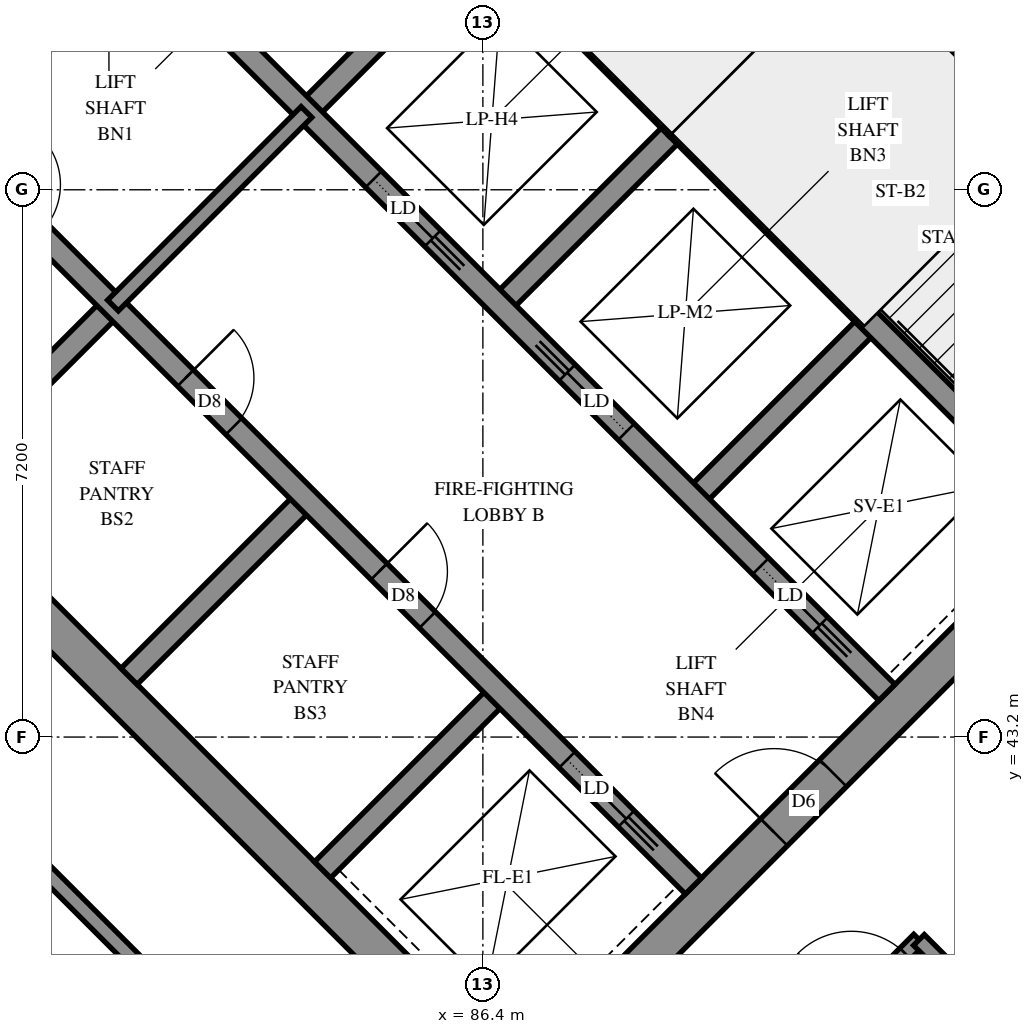
"""IFC4 building model, lengths in metres.
Left out: names, types, materials, properties, quantities, classifications, styles, units other than length and angle.
Written with IfcOpenShell. Run it as: python <this file> out.ifc"""

import sys

from ifc_helpers import new_model, si_unit, direction, frame, frame_2d, origin, place, context, subcontext, project, spatial, rectangle, extrude, element, fill, save


model = new_model("IFC4")
c1 = context("Model", 3, precision=1e-05, world=origin(), true_north=direction((0.0, 1.0)))
c2 = subcontext(c1, "Body", "Model", "MODEL_VIEW")
j1 = project(units=[si_unit("LENGTHUNIT", "METRE"), si_unit("PLANEANGLEUNIT", "RADIAN")], contexts=[c1])
p1 = place(None, origin())
s1 = spatial("IfcSite", under=j1, at=p1, CompositionType="ELEMENT")
p2 = place(p1, origin())
s2 = spatial("IfcBuilding", under=s1, at=p2, CompositionType="ELEMENT")
p3 = place(p2, frame((0.0, 0.0, 203.2)))
s3 = spatial("IfcBuildingStorey", under=s2, at=p3, CompositionType="ELEMENT", Elevation=203.2)
p4 = place(p3, frame((76.124, 49.267, -0.3), z_axis=(0.0, 0.0, 1.0), x_axis=(0.7071067812, -0.7071067812, 0.0)))
e1 = element("IfcWall", 1, at=p4, inside=s3, PredefinedType="SHEAR", context=c2, shape_type="SweptSolid", body=[
    extrude(rectangle(XDim=15.4, YDim=0.5, at=frame_2d((7.7, 0.0))), origin(), (0.0, 0.0, 1.0), 2.7),
])
p5 = place(p3, frame((86.66, 59.802, -0.3), z_axis=(0.0, 0.0, 1.0), x_axis=(0.7071067812, -0.7071067812, 0.0)))
e2 = element("IfcWall", 2, at=p5, inside=s3, PredefinedType="SHEAR", context=c2, shape_type="SweptSolid", body=[
    extrude(rectangle(XDim=15.4, YDim=0.5, at=frame_2d((7.7, 0.0))), origin(), (0.0, 0.0, 1.0), 2.7),
])
p6 = place(p5, frame((10.5, 0.0, 0.3)))
e3 = element("IfcOpeningElement", 3, at=p6, cuts=e2, PredefinedType="OPENING", context=c2, shape_type="SweptSolid", body=[
    extrude(rectangle(XDim=0.8, YDim=2.1, at=frame_2d((0.4, 1.05))), frame((0.0, 0.26, 0.0), z_axis=(0.0, -1.0, 0.0), x_axis=(1.0, 0.0, 0.0)), (0.0, 0.0, 1.0), 0.52),
])
p7 = place(p3, frame((76.478, 49.267, -0.3), z_axis=(0.0, 0.0, 1.0), x_axis=(0.7071067812, 0.7071067812, 0.0)))
e4 = element("IfcWall", 4, at=p7, inside=s3, PredefinedType="SHEAR", context=c2, shape_type="SweptSolid", body=[
    extrude(rectangle(XDim=14.4, YDim=0.5, at=frame_2d((7.2, 0.0))), origin(), (0.0, 0.0, 1.0), 2.7),
])
p8 = place(p7, frame((4.55, 0.0, 0.3)))
e5 = element("IfcOpeningElement", 5, at=p8, cuts=e4, PredefinedType="OPENING", context=c2, shape_type="SweptSolid", body=[
    extrude(rectangle(XDim=1.1, YDim=2.1, at=frame_2d((0.55, 1.05))), frame((0.0, 0.26, 0.0), z_axis=(0.0, -1.0, 0.0), x_axis=(1.0, 0.0, 0.0)), (0.0, 0.0, 1.0), 0.52),
])
p9 = place(p7, frame((11.35, 0.0, 0.3)))
e6 = element("IfcOpeningElement", 6, at=p9, cuts=e4, PredefinedType="OPENING", context=c2, shape_type="SweptSolid", body=[
    extrude(rectangle(XDim=1.1, YDim=2.1, at=frame_2d((0.55, 1.05))), frame((0.0, 0.26, 0.0), z_axis=(0.0, -1.0, 0.0), x_axis=(1.0, 0.0, 0.0)), (0.0, 0.0, 1.0), 0.52),
])
p10 = place(p3, frame((87.013, 38.731, -0.3), z_axis=(0.0, 0.0, 1.0), x_axis=(0.7071067812, 0.7071067812, 0.0)))
e7 = element("IfcWall", 7, at=p10, inside=s3, PredefinedType="SHEAR", context=c2, shape_type="SweptSolid", body=[
    extrude(rectangle(XDim=14.4, YDim=0.5, at=frame_2d((7.2, 0.0))), origin(), (0.0, 0.0, 1.0), 2.7),
])
p11 = place(p10, frame((4.55, 0.0, 0.3)))
e8 = element("IfcOpeningElement", 8, at=p11, cuts=e7, PredefinedType="OPENING", context=c2, shape_type="SweptSolid", body=[
    extrude(rectangle(XDim=1.1, YDim=2.1, at=frame_2d((0.55, 1.05))), frame((0.0, 0.26, 0.0), z_axis=(0.0, -1.0, 0.0), x_axis=(1.0, 0.0, 0.0)), (0.0, 0.0, 1.0), 0.52),
])
p12 = place(p10, frame((11.35, 0.0, 0.3)))
e9 = element("IfcOpeningElement", 9, at=p12, cuts=e7, PredefinedType="OPENING", context=c2, shape_type="SweptSolid", body=[
    extrude(rectangle(XDim=1.1, YDim=2.1, at=frame_2d((0.55, 1.05))), frame((0.0, 0.26, 0.0), z_axis=(0.0, -1.0, 0.0), x_axis=(1.0, 0.0, 0.0)), (0.0, 0.0, 1.0), 0.52),
])
for number, where, z_axis, x_axis in (
    (10, (79.2, 46.544, 0.0), (0.0, 0.0, 1.0), (0.707, 0.707, 0.0)),
    (11, (84.079, 51.423, 0.0), (0.0, 0.0, 1.0), (0.707, 0.707, 0.0)),
):
    element("IfcWall", number, at=place(p3, frame(where, z_axis=z_axis, x_axis=x_axis)), inside=s3, PredefinedType="SOLIDWALL", context=c2, shape_type="SweptSolid", body=[
        extrude(rectangle(XDim=3.3, YDim=0.3, at=frame_2d((1.65, 0.0))), origin(), (0.0, 0.0, 1.0), 3.1),
    ])
p13 = place(p3, frame((81.746, 43.999, 0.0), z_axis=(0.0, 0.0, 1.0), x_axis=(0.7071067812, 0.7071067812, 0.0)))
e12 = element("IfcWall", 12, at=p13, inside=s3, PredefinedType="SOLIDWALL", context=c2, shape_type="SweptSolid", body=[
    extrude(rectangle(XDim=3.3, YDim=0.3, at=frame_2d((1.65, 0.0))), origin(), (0.0, 0.0, 1.0), 3.1),
])
p14 = place(p3, frame((86.625, 48.878, 0.0), z_axis=(0.0, 0.0, 1.0), x_axis=(0.7071067812, 0.7071067812, 0.0)))
e13 = element("IfcWall", 13, at=p14, inside=s3, PredefinedType="SOLIDWALL", context=c2, shape_type="SweptSolid", body=[
    extrude(rectangle(XDim=3.3, YDim=0.3, at=frame_2d((1.65, 0.0))), origin(), (0.0, 0.0, 1.0), 3.1),
])
p15 = place(p3, frame((84.291, 41.453, 0.0), z_axis=(0.0, 0.0, 1.0), x_axis=(0.7071067812, 0.7071067812, 0.0)))
e14 = element("IfcWall", 14, at=p15, inside=s3, PredefinedType="SOLIDWALL", context=c2, shape_type="SweptSolid", body=[
    extrude(rectangle(XDim=3.3, YDim=0.3, at=frame_2d((1.65, 0.0))), origin(), (0.0, 0.0, 1.0), 3.1),
])
p16 = place(p3, frame((89.17, 46.332, 0.0), z_axis=(0.0, 0.0, 1.0), x_axis=(0.7071067812, 0.7071067812, 0.0)))
e15 = element("IfcWall", 15, at=p16, inside=s3, PredefinedType="SOLIDWALL", context=c2, shape_type="SweptSolid", body=[
    extrude(rectangle(XDim=3.3, YDim=0.3, at=frame_2d((1.65, 0.0))), origin(), (0.0, 0.0, 1.0), 3.1),
])
p17 = place(p3, frame((78.988, 51.423, 0.0), z_axis=(0.0, 0.0, 1.0), x_axis=(0.7071067812, -0.7071067812, 0.0)))
e16 = element("IfcWall", 16, at=p17, inside=s3, PredefinedType="SOLIDWALL", context=c2, shape_type="SweptSolid", body=[
    extrude(rectangle(XDim=14.4, YDim=0.3, at=frame_2d((7.2, 0.0))), origin(), (0.0, 0.0, 1.0), 3.1),
])
p18 = place(p17, frame((1.35, 0.0, 0.0)))
e17 = element("IfcOpeningElement", 17, at=p18, cuts=e16, PredefinedType="OPENING", context=c2, shape_type="SweptSolid", body=[
    extrude(rectangle(XDim=0.9, YDim=2.1, at=frame_2d((0.45, 1.05))), frame((0.0, 0.16, 0.0), z_axis=(0.0, -1.0, 0.0), x_axis=(1.0, 0.0, 0.0)), (0.0, 0.0, 1.0), 0.32),
])
p19 = place(p17, frame((4.95, 0.0, 0.0)))
e18 = element("IfcOpeningElement", 18, at=p19, cuts=e16, PredefinedType="OPENING", context=c2, shape_type="SweptSolid", body=[
    extrude(rectangle(XDim=0.9, YDim=2.1, at=frame_2d((0.45, 1.05))), frame((0.0, 0.16, 0.0), z_axis=(0.0, -1.0, 0.0), x_axis=(1.0, 0.0, 0.0)), (0.0, 0.0, 1.0), 0.32),
])
p20 = place(p17, frame((8.55, 0.0, 0.0)))
e19 = element("IfcOpeningElement", 19, at=p20, cuts=e16, PredefinedType="OPENING", context=c2, shape_type="SweptSolid", body=[
    extrude(rectangle(XDim=0.9, YDim=2.1, at=frame_2d((0.45, 1.05))), frame((0.0, 0.16, 0.0), z_axis=(0.0, -1.0, 0.0), x_axis=(1.0, 0.0, 0.0)), (0.0, 0.0, 1.0), 0.32),
])
p21 = place(p17, frame((12.05, 0.0, 0.0)))
e20 = element("IfcOpeningElement", 20, at=p21, cuts=e16, PredefinedType="OPENING", context=c2, shape_type="SweptSolid", body=[
    extrude(rectangle(XDim=1.1, YDim=2.1, at=frame_2d((0.55, 1.05))), frame((0.0, 0.16, 0.0), z_axis=(0.0, -1.0, 0.0), x_axis=(1.0, 0.0, 0.0)), (0.0, 0.0, 1.0), 0.32),
])
p22 = place(p3, frame((81.534, 53.969, 0.0), z_axis=(0.0, 0.0, 1.0), x_axis=(0.707103309, -0.7071102534, 0.0)))
e21 = element("IfcWall", 21, at=p22, inside=s3, PredefinedType="SOLIDWALL", context=c2, shape_type="SweptSolid", body=[
    extrude(rectangle(XDim=14.4, YDim=0.3, at=frame_2d((7.2, 0.0))), origin(), (0.0, 0.0, 1.0), 3.1),
])
p23 = place(p22, frame((1.25, 0.0, 0.0)))
e22 = element("IfcOpeningElement", 22, at=p23, cuts=e21, PredefinedType="OPENING", context=c2, shape_type="SweptSolid", body=[
    extrude(rectangle(XDim=1.1, YDim=2.1, at=frame_2d((0.55, 1.05))), frame((0.0, 0.16, 0.0), z_axis=(0.0, -1.0, 0.0), x_axis=(1.0, 0.0, 0.0)), (0.0, 0.0, 1.0), 0.32),
])
p24 = place(p22, frame((4.85, 0.0, 0.0)))
e23 = element("IfcOpeningElement", 23, at=p24, cuts=e21, PredefinedType="OPENING", context=c2, shape_type="SweptSolid", body=[
    extrude(rectangle(XDim=1.1, YDim=2.1, at=frame_2d((0.55, 1.05))), frame((0.0, 0.16, 0.0), z_axis=(0.0, -1.0, 0.0), x_axis=(1.0, 0.0, 0.0)), (0.0, 0.0, 1.0), 0.32),
])
p25 = place(p22, frame((8.45, 0.0, 0.0)))
e24 = element("IfcOpeningElement", 24, at=p25, cuts=e21, PredefinedType="OPENING", context=c2, shape_type="SweptSolid", body=[
    extrude(rectangle(XDim=1.1, YDim=2.1, at=frame_2d((0.55, 1.05))), frame((0.0, 0.16, 0.0), z_axis=(0.0, -1.0, 0.0), x_axis=(1.0, 0.0, 0.0)), (0.0, 0.0, 1.0), 0.32),
])
p26 = place(p22, frame((12.05, 0.0, 0.0)))
e25 = element("IfcOpeningElement", 25, at=p26, cuts=e21, PredefinedType="OPENING", context=c2, shape_type="SweptSolid", body=[
    extrude(rectangle(XDim=1.1, YDim=2.1, at=frame_2d((0.55, 1.05))), frame((0.0, 0.16, 0.0), z_axis=(0.0, -1.0, 0.0), x_axis=(1.0, 0.0, 0.0)), (0.0, 0.0, 1.0), 0.32),
])
for number, where, z_axis, x_axis in (
    (26, (83.867, 56.302, 0.0), (0.0, 0.0, 1.0), (0.707, -0.707, 0.0)),
    (27, (88.958, 51.211, 0.0), (0.0, 0.0, 1.0), (0.707, -0.707, 0.0)),
):
    element("IfcWall", number, at=place(p3, frame(where, z_axis=z_axis, x_axis=x_axis)), inside=s3, PredefinedType="SOLIDWALL", context=c2, shape_type="SweptSolid", body=[
        extrude(rectangle(XDim=7.2, YDim=0.3, at=frame_2d((3.6, 0.0))), origin(), (0.0, 0.0, 1.0), 3.1),
    ])
p27 = place(p3, frame((88.958, 51.211, 0.0), z_axis=(0.0, 0.0, 1.0), x_axis=(0.7071067812, 0.7071067812, 0.0)))
e28 = element("IfcWall", 28, at=p27, inside=s3, PredefinedType="SOLIDWALL", context=c2, shape_type="SweptSolid", body=[
    extrude(rectangle(XDim=4.2, YDim=0.3, at=frame_2d((2.1, 0.0))), origin(), (0.0, 0.0, 1.0), 3.1),
])
p28 = place(p3, frame((91.313, 53.354, 0.0), z_axis=(0.0, 0.0, 1.0), x_axis=(0.7071067812, -0.7071067812, 0.0)))
e29 = element("IfcWall", 29, at=p28, inside=s3, PredefinedType="PARTITIONING", context=c2, shape_type="SweptSolid", body=[
    extrude(rectangle(XDim=5.95, YDim=0.15, at=frame_2d((2.975, 0.0))), origin(), (0.0, 0.0, 1.0), 3.1),
])
p29 = place(p3, frame((81.534, 48.878, 0.0), z_axis=(0.0, 0.0, 1.0), x_axis=(0.707092892, 0.7071206701, 0.0)))
e30 = element("IfcWall", 30, at=p29, inside=s3, PredefinedType="PARTITIONING", context=c2, shape_type="SweptSolid", body=[
    extrude(rectangle(XDim=3.6, YDim=0.2, at=frame_2d((1.8, 0.0))), origin(), (0.0, 0.0, 1.0), 3.1),
])
p30 = place(p3, frame((86.835, 35.231, 0.0), z_axis=(0.0, 0.0, 1.0), x_axis=(0.7071067812, 0.7071067812, 0.0)))
e31 = element("IfcWall", 31, at=p30, inside=s3, PredefinedType="PARTITIONING", context=c2, shape_type="SweptSolid", body=[
    extrude(rectangle(XDim=7.501, YDim=0.2, at=frame_2d((3.751, 0.0))), origin(), (0.0, 0.0, 1.0), 3.1),
])
p31 = place(p30, frame((6.243, 0.0, 0.0)))
e32 = element("IfcOpeningElement", 32, at=p31, cuts=e31, PredefinedType="OPENING", context=c2, shape_type="SweptSolid", body=[
    extrude(rectangle(XDim=1.0, YDim=2.1, at=frame_2d((0.5, 1.05))), frame((0.0, 0.11, 0.0), z_axis=(0.0, -1.0, 0.0), x_axis=(1.0, 0.0, 0.0)), (0.0, 0.0, 1.0), 0.22),
])
p32 = place(p3, frame((80.522, 41.553, 0.0), z_axis=(0.0, 0.0, 1.0), x_axis=(0.7071067812, -0.7071067812, 0.0)))
e33 = element("IfcWall", 33, at=p32, inside=s3, PredefinedType="PARTITIONING", context=c2, shape_type="SweptSolid", body=[
    extrude(rectangle(XDim=6.836, YDim=0.2, at=frame_2d((3.418, 0.0))), origin(), (0.0, 0.0, 1.0), 3.1),
])
p33 = place(p3, frame((92.137, 40.531, 0.0), z_axis=(0.0, 0.0, 1.0), x_axis=(0.7071067812, -0.7071067812, 0.0)))
e34 = element("IfcWall", 34, at=p33, inside=s3, PredefinedType="PARTITIONING", context=c2, shape_type="SweptSolid", body=[
    extrude(rectangle(XDim=4.599, YDim=0.2, at=frame_2d((2.3, 0.0))), origin(), (0.0, 0.0, 1.0), 3.1),
])
p34 = place(p33, frame((3.083, 0.0, 0.0)))
e35 = element("IfcOpeningElement", 35, at=p34, cuts=e34, PredefinedType="OPENING", context=c2, shape_type="SweptSolid", body=[
    extrude(rectangle(XDim=0.9, YDim=2.1, at=frame_2d((0.45, 1.05))), frame((0.0, 0.11, 0.0), z_axis=(0.0, -1.0, 0.0), x_axis=(1.0, 0.0, 0.0)), (0.0, 0.0, 1.0), 0.22),
])
p35 = place(p11, origin())
e36 = element("IfcDoor", 36, at=p35, inside=s3, OperationType="DOUBLE_DOOR_SINGLE_SWING", PredefinedType="DOOR", context=c2, shape_type="SweptSolid", body=[
    extrude(rectangle(XDim=1.1, YDim=2.1, at=frame_2d((0.55, 1.05))), frame((0.0, 0.025, 0.0), z_axis=(0.0, -1.0, 0.0), x_axis=(1.0, 0.0, 0.0)), (0.0, 0.0, 1.0), 0.05),
])
fill(e8, e36)
p36 = place(p19, origin())
e37 = element("IfcDoor", 37, at=p36, inside=s3, OperationType="SINGLE_SWING_LEFT", PredefinedType="DOOR", context=c2, shape_type="SweptSolid", body=[
    extrude(rectangle(XDim=0.9, YDim=2.1, at=frame_2d((0.45, 1.05))), frame((0.0, 0.025, 0.0), z_axis=(0.0, -1.0, 0.0), x_axis=(1.0, 0.0, 0.0)), (0.0, 0.0, 1.0), 0.05),
])
fill(e18, e37)
p37 = place(p20, origin())
e38 = element("IfcDoor", 38, at=p37, inside=s3, OperationType="SINGLE_SWING_LEFT", PredefinedType="DOOR", context=c2, shape_type="SweptSolid", body=[
    extrude(rectangle(XDim=0.9, YDim=2.1, at=frame_2d((0.45, 1.05))), frame((0.0, 0.025, 0.0), z_axis=(0.0, -1.0, 0.0), x_axis=(1.0, 0.0, 0.0)), (0.0, 0.0, 1.0), 0.05),
])
fill(e19, e38)
p38 = place(p21, origin())
e39 = element("IfcDoor", 39, at=p38, inside=s3, OperationType="SLIDING_TO_RIGHT", PredefinedType="DOOR", context=c2, shape_type="SweptSolid", body=[
    extrude(rectangle(XDim=1.1, YDim=2.1, at=frame_2d((0.55, 1.05))), frame((0.0, 0.025, 0.0), z_axis=(0.0, -1.0, 0.0), x_axis=(1.0, 0.0, 0.0)), (0.0, 0.0, 1.0), 0.05),
])
fill(e20, e39)
p39 = place(p24, origin())
e40 = element("IfcDoor", 40, at=p39, inside=s3, OperationType="SLIDING_TO_RIGHT", PredefinedType="DOOR", context=c2, shape_type="SweptSolid", body=[
    extrude(rectangle(XDim=1.1, YDim=2.1, at=frame_2d((0.55, 1.05))), frame((0.0, 0.025, 0.0), z_axis=(0.0, -1.0, 0.0), x_axis=(1.0, 0.0, 0.0)), (0.0, 0.0, 1.0), 0.05),
])
fill(e23, e40)
p40 = place(p25, origin())
e41 = element("IfcDoor", 41, at=p40, inside=s3, OperationType="SLIDING_TO_LEFT", PredefinedType="DOOR", context=c2, shape_type="SweptSolid", body=[
    extrude(rectangle(XDim=1.1, YDim=2.1, at=frame_2d((0.55, 1.05))), frame((0.0, 0.025, 0.0), z_axis=(0.0, -1.0, 0.0), x_axis=(1.0, 0.0, 0.0)), (0.0, 0.0, 1.0), 0.05),
])
fill(e24, e41)
p41 = place(p26, origin())
e42 = element("IfcDoor", 42, at=p41, inside=s3, OperationType="SLIDING_TO_RIGHT", PredefinedType="DOOR", context=c2, shape_type="SweptSolid", body=[
    extrude(rectangle(XDim=1.1, YDim=2.1, at=frame_2d((0.55, 1.05))), frame((0.0, 0.025, 0.0), z_axis=(0.0, -1.0, 0.0), x_axis=(1.0, 0.0, 0.0)), (0.0, 0.0, 1.0), 0.05),
])
fill(e25, e42)
p42 = place(p31, origin())
e43 = element("IfcDoor", 43, at=p42, inside=s3, OperationType="SINGLE_SWING_RIGHT", PredefinedType="DOOR", context=c2, shape_type="SweptSolid", body=[
    extrude(rectangle(XDim=1.0, YDim=2.1, at=frame_2d((0.5, 1.05))), frame((0.0, 0.025, 0.0), z_axis=(0.0, -1.0, 0.0), x_axis=(1.0, 0.0, 0.0)), (0.0, 0.0, 1.0), 0.05),
])
fill(e32, e43)
save(model, sys.argv[1])
